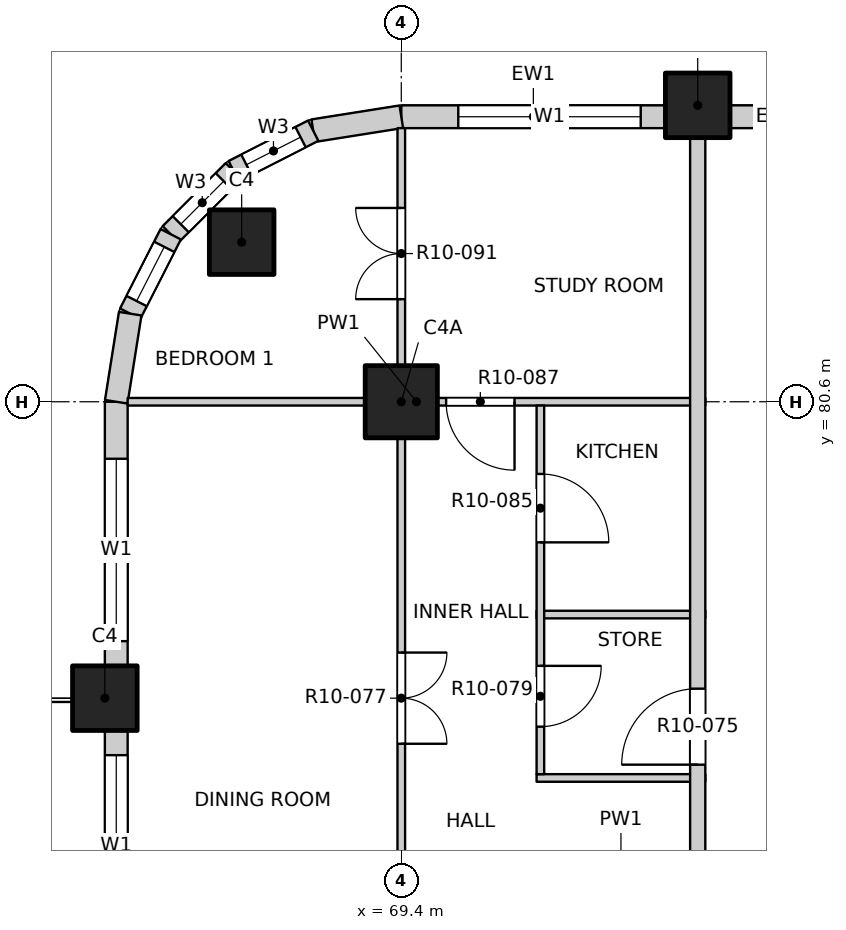
"""IFC4 building model, lengths in metres.
Left out: names, types, materials, properties, quantities, classifications, styles, units other than length and angle.
Written with IfcOpenShell. Run it as: python <this file> out.ifc"""

import sys

from ifc_helpers import new_model, si_unit, direction, frame, frame_2d, origin, origin_2d, place, context, subcontext, project, spatial, rectangle, extrude, element, fill, save


model = new_model("IFC4")
c1 = context("Model", 3, precision=1e-05, world=origin(), true_north=direction((0.0, 1.0)))
c2 = subcontext(c1, "Body", "Model", "MODEL_VIEW")
j1 = project(units=[si_unit("LENGTHUNIT", "METRE"), si_unit("PLANEANGLEUNIT", "RADIAN")], contexts=[c1])
p1 = place(None, origin())
s1 = spatial("IfcSite", under=j1, at=p1, CompositionType="ELEMENT")
p2 = place(p1, origin())
s2 = spatial("IfcBuilding", under=s1, at=p2, CompositionType="ELEMENT")
p3 = place(p2, frame((0.0, 0.0, 127.1)))
s3 = spatial("IfcBuildingStorey", under=s2, at=p3, CompositionType="ELEMENT", Elevation=127.1)
for number, where, z_axis, x_axis in (
    (1, (67.3, 82.7, -0.25), (0.0, 0.0, 1.0), (1.0, 0.0, 0.0)),
    (2, (73.3, 84.5, -0.25), (0.0, 0.0, 1.0), (1.0, 0.0, 0.0)),
    (3, (65.5, 76.7, -0.25), (0.0, 0.0, 1.0), (1.0, 0.0, 0.0)),
):
    element("IfcColumn", number, at=place(p3, frame(where, z_axis=z_axis, x_axis=x_axis)), inside=s3, PredefinedType="COLUMN", context=c2, shape_type="SweptSolid", body=[
        extrude(rectangle(XDim=0.85, YDim=0.85, at=origin_2d()), origin(), (0.0, 0.0, 1.0), 3.4),
    ])
p4 = place(p3, frame((69.4, 80.6, -0.25), z_axis=(0.0, 0.0, 1.0), x_axis=(1.0, 0.0, 0.0)))
e4 = element("IfcColumn", 4, at=p4, inside=s3, PredefinedType="COLUMN", context=c2, shape_type="SweptSolid", body=[
    extrude(rectangle(XDim=0.95, YDim=0.95, at=origin_2d()), origin(), (0.0, 0.0, 1.0), 3.4),
])
p5 = place(p3, frame((69.4, 84.35, 0.0), z_axis=(0.0, 0.0, 1.0), x_axis=(1.0, 0.0, 0.0)))
e5 = element("IfcWall", 5, at=p5, inside=s3, PredefinedType="SOLIDWALL", context=c2, shape_type="SweptSolid", body=[
    extrude(rectangle(XDim=3.475, YDim=0.3, at=frame_2d((1.738, 0.0))), origin(), (0.0, 0.0, 1.0), 2.7),
])
p6 = place(p5, frame((0.75, 0.0, 0.9)))
e6 = element("IfcOpeningElement", 6, at=p6, cuts=e5, PredefinedType="OPENING", context=c2, shape_type="SweptSolid", body=[
    extrude(rectangle(XDim=2.4, YDim=1.8, at=frame_2d((1.2, 0.9))), frame((0.0, 0.16, 0.0), z_axis=(0.0, -1.0, 0.0), x_axis=(1.0, 0.0, 0.0)), (0.0, 0.0, 1.0), 0.32),
])
p7 = place(p3, frame((73.725, 84.35, 0.0), z_axis=(0.0, 0.0, 1.0), x_axis=(1.0, 0.0, 0.0)))
e7 = element("IfcWall", 7, at=p7, inside=s3, PredefinedType="SOLIDWALL", context=c2, shape_type="SweptSolid", body=[
    extrude(rectangle(XDim=1.25, YDim=0.3, at=frame_2d((0.625, 0.0))), origin(), (0.0, 0.0, 1.0), 2.7),
])
p8 = place(p3, frame((65.65, 69.325, 0.0), z_axis=(0.0, 0.0, 1.0), x_axis=(0.0, 1.0, 0.0)))
e8 = element("IfcWall", 8, at=p8, inside=s3, PredefinedType="SOLIDWALL", context=c2, shape_type="SweptSolid", body=[
    extrude(rectangle(XDim=6.95, YDim=0.3, at=frame_2d((3.475, 0.0))), origin(), (0.0, 0.0, 1.0), 2.7),
])
p9 = place(p8, frame((0.625, 0.0, 0.0)))
e9 = element("IfcOpeningElement", 9, at=p9, cuts=e8, PredefinedType="OPENING", context=c2, shape_type="SweptSolid", body=[
    extrude(rectangle(XDim=1.8, YDim=2.4, at=frame_2d((0.9, 1.2))), frame((0.0, 0.16, 0.0), z_axis=(0.0, -1.0, 0.0), x_axis=(1.0, 0.0, 0.0)), (0.0, 0.0, 1.0), 0.32),
])
p10 = place(p8, frame((4.225, 0.0, 0.9)))
e10 = element("IfcOpeningElement", 10, at=p10, cuts=e8, PredefinedType="OPENING", context=c2, shape_type="SweptSolid", body=[
    extrude(rectangle(XDim=2.4, YDim=1.8, at=frame_2d((1.2, 0.9))), frame((0.0, 0.16, 0.0), z_axis=(0.0, -1.0, 0.0), x_axis=(1.0, 0.0, 0.0)), (0.0, 0.0, 1.0), 0.32),
])
p11 = place(p3, frame((65.65, 77.125, 0.0), z_axis=(0.0, 0.0, 1.0), x_axis=(0.0, 1.0, 0.0)))
e11 = element("IfcWall", 11, at=p11, inside=s3, PredefinedType="SOLIDWALL", context=c2, shape_type="SweptSolid", body=[
    extrude(rectangle(XDim=3.475, YDim=0.3, at=frame_2d((1.738, 0.0))), origin(), (0.0, 0.0, 1.0), 2.7),
])
p12 = place(p11, frame((0.325, 0.0, 0.9)))
e12 = element("IfcOpeningElement", 12, at=p12, cuts=e11, PredefinedType="OPENING", context=c2, shape_type="SweptSolid", body=[
    extrude(rectangle(XDim=2.4, YDim=1.8, at=frame_2d((1.2, 0.9))), frame((0.0, 0.16, 0.0), z_axis=(0.0, -1.0, 0.0), x_axis=(1.0, 0.0, 0.0)), (0.0, 0.0, 1.0), 0.32),
])
p13 = place(p3, frame((69.4, 84.35, 0.0), z_axis=(0.0, 0.0, 1.0), x_axis=(-0.987678452879, -0.156496880861, 0.0)))
e13 = element("IfcWall", 13, at=p13, inside=s3, PredefinedType="SOLIDWALL", context=c2, shape_type="SweptSolid", body=[
    extrude(rectangle(XDim=1.173, YDim=0.3, at=frame_2d((0.586, 0.0))), origin(), (0.0, 0.0, 1.0), 2.7),
])
p14 = place(p3, frame((68.241, 84.167, 0.0), z_axis=(0.0, 0.0, 1.0), x_axis=(-0.890988677504, -0.454025524128, 0.0)))
e14 = element("IfcWall", 14, at=p14, inside=s3, PredefinedType="SOLIDWALL", context=c2, shape_type="SweptSolid", body=[
    extrude(rectangle(XDim=1.173, YDim=0.3, at=frame_2d((0.587, 0.0))), origin(), (0.0, 0.0, 1.0), 2.7),
])
p15 = place(p14, frame((0.187, 0.0, 0.9)))
e15 = element("IfcOpeningElement", 15, at=p15, cuts=e14, PredefinedType="OPENING", context=c2, shape_type="SweptSolid", body=[
    extrude(rectangle(XDim=0.8, YDim=1.2, at=frame_2d((0.4, 0.6))), frame((0.0, 0.16, 0.0), z_axis=(0.0, -1.0, 0.0), x_axis=(1.0, 0.0, 0.0)), (0.0, 0.0, 1.0), 0.32),
])
p16 = place(p3, frame((67.196, 83.634, 0.0), z_axis=(0.0, 0.0, 1.0), x_axis=(-0.707106781187, -0.707106781187, 0.0)))
e16 = element("IfcWall", 16, at=p16, inside=s3, PredefinedType="SOLIDWALL", context=c2, shape_type="SweptSolid", body=[
    extrude(rectangle(XDim=1.173, YDim=0.3, at=frame_2d((0.586, 0.0))), origin(), (0.0, 0.0, 1.0), 2.7),
])
p17 = place(p16, frame((0.187, 0.0, 0.9)))
e17 = element("IfcOpeningElement", 17, at=p17, cuts=e16, PredefinedType="OPENING", context=c2, shape_type="SweptSolid", body=[
    extrude(rectangle(XDim=0.8, YDim=1.2, at=frame_2d((0.4, 0.6))), frame((0.0, 0.16, 0.0), z_axis=(0.0, -1.0, 0.0), x_axis=(1.0, 0.0, 0.0)), (0.0, 0.0, 1.0), 0.32),
])
p18 = place(p3, frame((66.366, 82.804, 0.0), z_axis=(0.0, 0.0, 1.0), x_axis=(-0.454025524128, -0.890988677504, 0.0)))
e18 = element("IfcWall", 18, at=p18, inside=s3, PredefinedType="SOLIDWALL", context=c2, shape_type="SweptSolid", body=[
    extrude(rectangle(XDim=1.173, YDim=0.3, at=frame_2d((0.587, 0.0))), origin(), (0.0, 0.0, 1.0), 2.7),
])
p19 = place(p18, frame((0.187, 0.0, 0.9)))
e19 = element("IfcOpeningElement", 19, at=p19, cuts=e18, PredefinedType="OPENING", context=c2, shape_type="SweptSolid", body=[
    extrude(rectangle(XDim=0.8, YDim=1.2, at=frame_2d((0.4, 0.6))), frame((0.0, 0.16, 0.0), z_axis=(0.0, -1.0, 0.0), x_axis=(1.0, 0.0, 0.0)), (0.0, 0.0, 1.0), 0.32),
])
p20 = place(p3, frame((65.833, 81.759, 0.0), z_axis=(0.0, 0.0, 1.0), x_axis=(-0.156496880861, -0.987678452879, 0.0)))
e20 = element("IfcWall", 20, at=p20, inside=s3, PredefinedType="SOLIDWALL", context=c2, shape_type="SweptSolid", body=[
    extrude(rectangle(XDim=1.173, YDim=0.3, at=frame_2d((0.586, 0.0))), origin(), (0.0, 0.0, 1.0), 2.7),
])
for number, where, z_axis, x_axis in (
    (21, (71.18, 75.65, 0.0), (0.0, 0.0, 1.0), (1.0, 0.0, 0.0)),
    (22, (71.18, 77.8, 0.0), (0.0, 0.0, 1.0), (1.0, 0.0, 0.0)),
):
    element("IfcWall", number, at=place(p3, frame(where, z_axis=z_axis, x_axis=x_axis)), inside=s3, PredefinedType="PARTITIONING", context=c2, shape_type="SweptSolid", body=[
        extrude(rectangle(XDim=2.22, YDim=0.1, at=frame_2d((1.11, 0.0))), origin(), (0.0, 0.0, 1.0), 3.15),
    ])
p21 = place(p3, frame((65.8, 80.6, 0.0), z_axis=(0.0, 0.0, 1.0), x_axis=(1.0, 0.0, 0.0)))
e23 = element("IfcWall", 23, at=p21, inside=s3, PredefinedType="PARTITIONING", context=c2, shape_type="SweptSolid", body=[
    extrude(rectangle(XDim=7.6, YDim=0.1, at=frame_2d((3.8, 0.0))), origin(), (0.0, 0.0, 1.0), 3.15),
])
p22 = place(p21, frame((4.19, 0.0, 0.0)))
e24 = element("IfcOpeningElement", 24, at=p22, cuts=e23, PredefinedType="OPENING", context=c2, shape_type="SweptSolid", body=[
    extrude(rectangle(XDim=0.9, YDim=2.1, at=frame_2d((0.45, 1.05))), frame((0.0, 0.06, 0.0), z_axis=(0.0, -1.0, 0.0), x_axis=(1.0, 0.0, 0.0)), (0.0, 0.0, 1.0), 0.12),
])
p23 = place(p3, frame((69.4, 45.8, 0.0), z_axis=(0.0, 0.0, 1.0), x_axis=(0.0, 1.0, 0.0)))
e25 = element("IfcWall", 25, at=p23, inside=s3, PredefinedType="PARTITIONING", context=c2, shape_type="SweptSolid", body=[
    extrude(rectangle(XDim=38.4, YDim=0.1, at=frame_2d((19.2, 0.0))), origin(), (0.0, 0.0, 1.0), 3.15),
])
p24 = place(p23, frame((1.05, 0.0, 0.0)))
e26 = element("IfcOpeningElement", 26, at=p24, cuts=e25, PredefinedType="OPENING", context=c2, shape_type="SweptSolid", body=[
    extrude(rectangle(XDim=1.2, YDim=2.1, at=frame_2d((0.6, 1.05))), frame((0.0, 0.06, 0.0), z_axis=(0.0, -1.0, 0.0), x_axis=(1.0, 0.0, 0.0)), (0.0, 0.0, 1.0), 0.12),
])
p25 = place(p23, frame((5.1, 0.0, 0.0)))
e27 = element("IfcOpeningElement", 27, at=p25, cuts=e25, PredefinedType="OPENING", context=c2, shape_type="SweptSolid", body=[
    extrude(rectangle(XDim=0.9, YDim=2.1, at=frame_2d((0.45, 1.05))), frame((0.0, 0.06, 0.0), z_axis=(0.0, -1.0, 0.0), x_axis=(1.0, 0.0, 0.0)), (0.0, 0.0, 1.0), 0.12),
])
p26 = place(p23, frame((9.0, 0.0, 0.0)))
e28 = element("IfcOpeningElement", 28, at=p26, cuts=e25, PredefinedType="OPENING", context=c2, shape_type="SweptSolid", body=[
    extrude(rectangle(XDim=0.9, YDim=2.1, at=frame_2d((0.45, 1.05))), frame((0.0, 0.06, 0.0), z_axis=(0.0, -1.0, 0.0), x_axis=(1.0, 0.0, 0.0)), (0.0, 0.0, 1.0), 0.12),
])
p27 = place(p23, frame((12.9, 0.0, 0.0)))
e29 = element("IfcOpeningElement", 29, at=p27, cuts=e25, PredefinedType="OPENING", context=c2, shape_type="SweptSolid", body=[
    extrude(rectangle(XDim=0.9, YDim=2.1, at=frame_2d((0.45, 1.05))), frame((0.0, 0.06, 0.0), z_axis=(0.0, -1.0, 0.0), x_axis=(1.0, 0.0, 0.0)), (0.0, 0.0, 1.0), 0.12),
])
p28 = place(p23, frame((19.775, 0.0, 0.0)))
e30 = element("IfcOpeningElement", 30, at=p28, cuts=e25, PredefinedType="OPENING", context=c2, shape_type="SweptSolid", body=[
    extrude(rectangle(XDim=1.2, YDim=2.1, at=frame_2d((0.6, 1.05))), frame((0.0, 0.06, 0.0), z_axis=(0.0, -1.0, 0.0), x_axis=(1.0, 0.0, 0.0)), (0.0, 0.0, 1.0), 0.12),
])
p29 = place(p23, frame((24.6, 0.0, 0.0)))
e31 = element("IfcOpeningElement", 31, at=p29, cuts=e25, PredefinedType="OPENING", context=c2, shape_type="SweptSolid", body=[
    extrude(rectangle(XDim=0.9, YDim=2.1, at=frame_2d((0.45, 1.05))), frame((0.0, 0.06, 0.0), z_axis=(0.0, -1.0, 0.0), x_axis=(1.0, 0.0, 0.0)), (0.0, 0.0, 1.0), 0.12),
])
p30 = place(p23, frame((30.3, 0.0, 0.0)))
e32 = element("IfcOpeningElement", 32, at=p30, cuts=e25, PredefinedType="OPENING", context=c2, shape_type="SweptSolid", body=[
    extrude(rectangle(XDim=1.2, YDim=2.1, at=frame_2d((0.6, 1.05))), frame((0.0, 0.06, 0.0), z_axis=(0.0, -1.0, 0.0), x_axis=(1.0, 0.0, 0.0)), (0.0, 0.0, 1.0), 0.12),
])
p31 = place(p23, frame((36.15, 0.0, 0.0)))
e33 = element("IfcOpeningElement", 33, at=p31, cuts=e25, PredefinedType="OPENING", context=c2, shape_type="SweptSolid", body=[
    extrude(rectangle(XDim=1.2, YDim=2.1, at=frame_2d((0.6, 1.05))), frame((0.0, 0.06, 0.0), z_axis=(0.0, -1.0, 0.0), x_axis=(1.0, 0.0, 0.0)), (0.0, 0.0, 1.0), 0.12),
])
p32 = place(p3, frame((71.23, 75.7, 0.0), z_axis=(0.0, 0.0, 1.0), x_axis=(0.0, 1.0, 0.0)))
e34 = element("IfcWall", 34, at=p32, inside=s3, PredefinedType="PARTITIONING", context=c2, shape_type="SweptSolid", body=[
    extrude(rectangle(XDim=4.85, YDim=0.1, at=frame_2d((2.425, 0.0))), origin(), (0.0, 0.0, 1.0), 3.15),
])
p33 = place(p32, frame((0.625, 0.0, 0.0)))
e35 = element("IfcOpeningElement", 35, at=p33, cuts=e34, PredefinedType="OPENING", context=c2, shape_type="SweptSolid", body=[
    extrude(rectangle(XDim=0.8, YDim=2.1, at=frame_2d((0.4, 1.05))), frame((0.0, 0.06, 0.0), z_axis=(0.0, -1.0, 0.0), x_axis=(1.0, 0.0, 0.0)), (0.0, 0.0, 1.0), 0.12),
])
p34 = place(p32, frame((3.05, 0.0, 0.0)))
e36 = element("IfcOpeningElement", 36, at=p34, cuts=e34, PredefinedType="OPENING", context=c2, shape_type="SweptSolid", body=[
    extrude(rectangle(XDim=0.9, YDim=2.1, at=frame_2d((0.45, 1.05))), frame((0.0, 0.06, 0.0), z_axis=(0.0, -1.0, 0.0), x_axis=(1.0, 0.0, 0.0)), (0.0, 0.0, 1.0), 0.12),
])
p35 = place(p3, frame((73.3, 53.4, 0.0), z_axis=(0.0, 0.0, 1.0), x_axis=(0.0, 1.0, 0.0)))
e37 = element("IfcWall", 37, at=p35, inside=s3, PredefinedType="PARTITIONING", context=c2, shape_type="SweptSolid", body=[
    extrude(rectangle(XDim=30.8, YDim=0.2, at=frame_2d((15.4, 0.0))), origin(), (0.0, 0.0, 1.0), 3.15),
])
p36 = place(p35, frame((3.175, 0.0, 0.0)))
e38 = element("IfcOpeningElement", 38, at=p36, cuts=e37, PredefinedType="OPENING", context=c2, shape_type="SweptSolid", body=[
    extrude(rectangle(XDim=1.0, YDim=2.1, at=frame_2d((0.5, 1.05))), frame((0.0, 0.11, 0.0), z_axis=(0.0, -1.0, 0.0), x_axis=(1.0, 0.0, 0.0)), (0.0, 0.0, 1.0), 0.22),
])
p37 = place(p35, frame((14.175, 0.0, 0.0)))
e39 = element("IfcOpeningElement", 39, at=p37, cuts=e37, PredefinedType="OPENING", context=c2, shape_type="SweptSolid", body=[
    extrude(rectangle(XDim=1.0, YDim=2.1, at=frame_2d((0.5, 1.05))), frame((0.0, 0.11, 0.0), z_axis=(0.0, -1.0, 0.0), x_axis=(1.0, 0.0, 0.0)), (0.0, 0.0, 1.0), 0.22),
])
p38 = place(p35, frame((22.425, 0.0, 0.0)))
e40 = element("IfcOpeningElement", 40, at=p38, cuts=e37, PredefinedType="OPENING", context=c2, shape_type="SweptSolid", body=[
    extrude(rectangle(XDim=1.0, YDim=2.1, at=frame_2d((0.5, 1.05))), frame((0.0, 0.11, 0.0), z_axis=(0.0, -1.0, 0.0), x_axis=(1.0, 0.0, 0.0)), (0.0, 0.0, 1.0), 0.22),
])
p39 = place(p6, origin())
e41 = element("IfcWindow", 41, at=p39, inside=s3, PartitioningType="DOUBLE_PANEL_VERTICAL", PredefinedType="WINDOW", context=c2, shape_type="SweptSolid", body=[
    extrude(rectangle(XDim=2.4, YDim=1.8, at=frame_2d((1.2, 0.9))), frame((0.0, 0.03, 0.0), z_axis=(0.0, -1.0, 0.0), x_axis=(1.0, 0.0, 0.0)), (0.0, 0.0, 1.0), 0.06),
])
fill(e6, e41)
p40 = place(p10, origin())
e42 = element("IfcWindow", 42, at=p40, inside=s3, PartitioningType="DOUBLE_PANEL_VERTICAL", PredefinedType="WINDOW", context=c2, shape_type="SweptSolid", body=[
    extrude(rectangle(XDim=2.4, YDim=1.8, at=frame_2d((1.2, 0.9))), frame((0.0, 0.03, 0.0), z_axis=(0.0, -1.0, 0.0), x_axis=(1.0, 0.0, 0.0)), (0.0, 0.0, 1.0), 0.06),
])
fill(e10, e42)
p41 = place(p12, origin())
e43 = element("IfcWindow", 43, at=p41, inside=s3, PartitioningType="DOUBLE_PANEL_VERTICAL", PredefinedType="WINDOW", context=c2, shape_type="SweptSolid", body=[
    extrude(rectangle(XDim=2.4, YDim=1.8, at=frame_2d((1.2, 0.9))), frame((0.0, 0.03, 0.0), z_axis=(0.0, -1.0, 0.0), x_axis=(1.0, 0.0, 0.0)), (0.0, 0.0, 1.0), 0.06),
])
fill(e12, e43)
p42 = place(p15, origin())
e44 = element("IfcWindow", 44, at=p42, inside=s3, PartitioningType="SINGLE_PANEL", PredefinedType="WINDOW", context=c2, shape_type="SweptSolid", body=[
    extrude(rectangle(XDim=0.8, YDim=1.2, at=frame_2d((0.4, 0.6))), frame((0.0, 0.03, 0.0), z_axis=(0.0, -1.0, 0.0), x_axis=(1.0, 0.0, 0.0)), (0.0, 0.0, 1.0), 0.06),
])
fill(e15, e44)
p43 = place(p17, origin())
e45 = element("IfcWindow", 45, at=p43, inside=s3, PartitioningType="SINGLE_PANEL", PredefinedType="WINDOW", context=c2, shape_type="SweptSolid", body=[
    extrude(rectangle(XDim=0.8, YDim=1.2, at=frame_2d((0.4, 0.6))), frame((0.0, 0.03, 0.0), z_axis=(0.0, -1.0, 0.0), x_axis=(1.0, 0.0, 0.0)), (0.0, 0.0, 1.0), 0.06),
])
fill(e17, e45)
p44 = place(p19, origin())
e46 = element("IfcWindow", 46, at=p44, inside=s3, PartitioningType="SINGLE_PANEL", PredefinedType="WINDOW", context=c2, shape_type="SweptSolid", body=[
    extrude(rectangle(XDim=0.8, YDim=1.2, at=frame_2d((0.4, 0.6))), frame((0.0, 0.03, 0.0), z_axis=(0.0, -1.0, 0.0), x_axis=(1.0, 0.0, 0.0)), (0.0, 0.0, 1.0), 0.06),
])
fill(e19, e46)
p45 = place(p38, origin())
e47 = element("IfcDoor", 47, at=p45, inside=s3, OperationType="SINGLE_SWING_RIGHT", PredefinedType="DOOR", context=c2, shape_type="SweptSolid", body=[
    extrude(rectangle(XDim=1.0, YDim=2.1, at=frame_2d((0.5, 1.05))), frame((0.0, 0.025, 0.0), z_axis=(0.0, -1.0, 0.0), x_axis=(1.0, 0.0, 0.0)), (0.0, 0.0, 1.0), 0.05),
])
fill(e40, e47)
p46 = place(p30, origin())
e48 = element("IfcDoor", 48, at=p46, inside=s3, OperationType="DOUBLE_DOOR_SINGLE_SWING", PredefinedType="DOOR", context=c2, shape_type="SweptSolid", body=[
    extrude(rectangle(XDim=1.2, YDim=2.1, at=frame_2d((0.6, 1.05))), frame((0.0, 0.025, 0.0), z_axis=(0.0, -1.0, 0.0), x_axis=(1.0, 0.0, 0.0)), (0.0, 0.0, 1.0), 0.05),
])
fill(e32, e48)
p47 = place(p33, origin())
e49 = element("IfcDoor", 49, at=p47, inside=s3, OperationType="SINGLE_SWING_LEFT", PredefinedType="DOOR", context=c2, shape_type="SweptSolid", body=[
    extrude(rectangle(XDim=0.8, YDim=2.1, at=frame_2d((0.4, 1.05))), frame((0.0, 0.025, 0.0), z_axis=(0.0, -1.0, 0.0), x_axis=(1.0, 0.0, 0.0)), (0.0, 0.0, 1.0), 0.05),
])
fill(e35, e49)
p48 = place(p34, origin())
e50 = element("IfcDoor", 50, at=p48, inside=s3, OperationType="SINGLE_SWING_RIGHT", PredefinedType="DOOR", context=c2, shape_type="SweptSolid", body=[
    extrude(rectangle(XDim=0.9, YDim=2.1, at=frame_2d((0.45, 1.05))), frame((0.0, 0.025, 0.0), z_axis=(0.0, -1.0, 0.0), x_axis=(1.0, 0.0, 0.0)), (0.0, 0.0, 1.0), 0.05),
])
fill(e36, e50)
p49 = place(p22, origin())
e51 = element("IfcDoor", 51, at=p49, inside=s3, OperationType="SINGLE_SWING_LEFT", PredefinedType="DOOR", context=c2, shape_type="SweptSolid", body=[
    extrude(rectangle(XDim=0.9, YDim=2.1, at=frame_2d((0.45, 1.05))), frame((0.0, 0.025, 0.0), z_axis=(0.0, -1.0, 0.0), x_axis=(1.0, 0.0, 0.0)), (0.0, 0.0, 1.0), 0.05),
])
fill(e24, e51)
p50 = place(p31, origin())
e52 = element("IfcDoor", 52, at=p50, inside=s3, OperationType="DOUBLE_DOOR_SINGLE_SWING", PredefinedType="DOOR", context=c2, shape_type="SweptSolid", body=[
    extrude(rectangle(XDim=1.2, YDim=2.1, at=frame_2d((0.6, 1.05))), frame((0.0, 0.025, 0.0), z_axis=(0.0, -1.0, 0.0), x_axis=(1.0, 0.0, 0.0)), (0.0, 0.0, 1.0), 0.05),
])
fill(e33, e52)
save(model, sys.argv[1])
